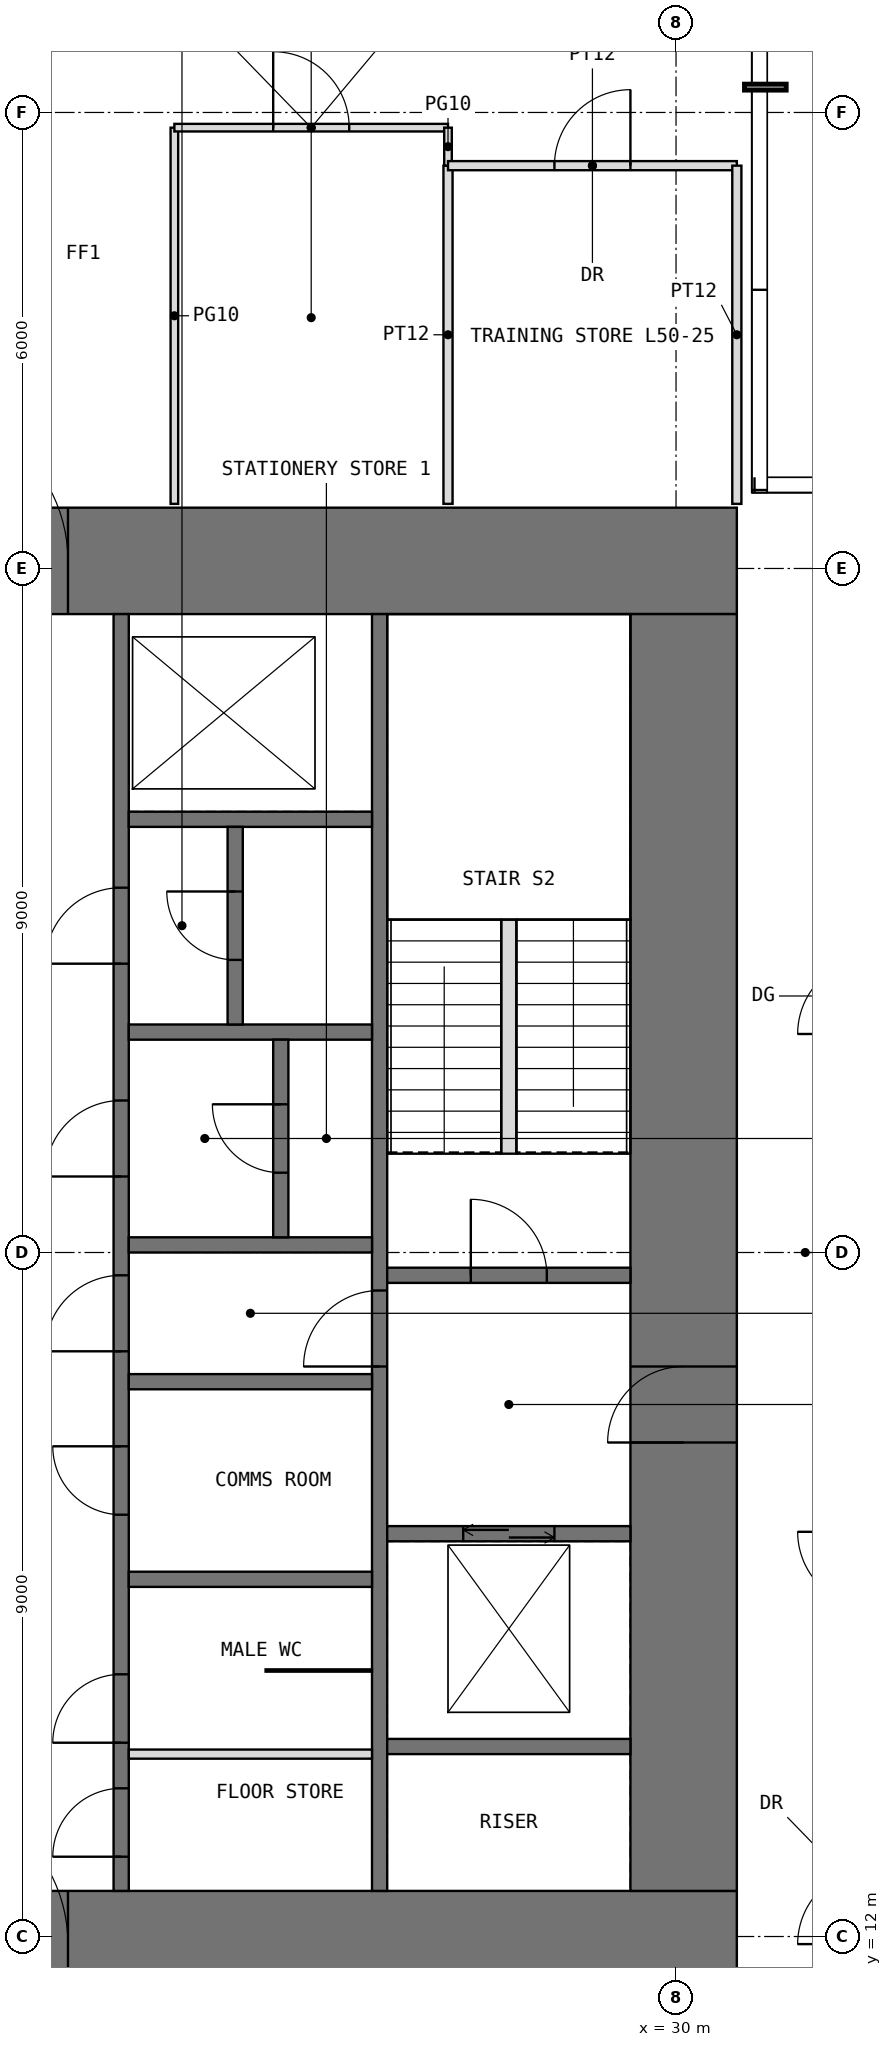
"""IFC4 building model, lengths in metres.
Left out: names, types, materials, properties, quantities, classifications, styles, units other than length and angle.
Written with IfcOpenShell. Run it as: python <this file> out.ifc"""

import sys

from ifc_helpers import new_model, si_unit, direction, frame, frame_2d, origin, place, context, subcontext, project, spatial, rectangle, extrude, element, fill, save


model = new_model("IFC4")
c1 = context("Model", 3, precision=1e-05, world=origin(), true_north=direction((0.0, 1.0)))
c2 = subcontext(c1, "Body", "Model", "MODEL_VIEW")
j1 = project(units=[si_unit("LENGTHUNIT", "METRE"), si_unit("PLANEANGLEUNIT", "RADIAN")], contexts=[c1])
p1 = place(None, origin())
s1 = spatial("IfcSite", under=j1, at=p1, CompositionType="ELEMENT")
p2 = place(p1, origin())
s2 = spatial("IfcBuilding", under=s1, at=p2, CompositionType="ELEMENT")
p3 = place(p2, frame((0.0, 0.0, 210.5)))
s3 = spatial("IfcBuildingStorey", under=s2, at=p3, CompositionType="ELEMENT", Elevation=210.5)
p4 = place(p3, frame((11.2, 11.9, -0.05), z_axis=(0.0, 0.0, 1.0), x_axis=(1.0, 0.0, 0.0)))
e1 = element("IfcWall", 1, at=p4, inside=s3, PredefinedType="SHEAR", context=c2, shape_type="SweptSolid", body=[
    extrude(rectangle(XDim=19.6, YDim=1.4, at=frame_2d((9.8, 0.0))), origin(), (0.0, 0.0, 1.0), 4.0),
])
p5 = place(p4, frame((8.8, 0.0, 0.05)))
e2 = element("IfcOpeningElement", 2, at=p5, cuts=e1, PredefinedType="OPENING", context=c2, shape_type="SweptSolid", body=[
    extrude(rectangle(XDim=2.0, YDim=2.2, at=frame_2d((1.0, 1.1))), frame((0.0, 0.71, 0.0), z_axis=(0.0, -1.0, 0.0), x_axis=(1.0, 0.0, 0.0)), (0.0, 0.0, 1.0), 1.42),
])
p6 = place(p3, frame((11.2, 30.1, -0.05), z_axis=(0.0, 0.0, 1.0), x_axis=(1.0, 0.0, 0.0)))
e3 = element("IfcWall", 3, at=p6, inside=s3, PredefinedType="SHEAR", context=c2, shape_type="SweptSolid", body=[
    extrude(rectangle(XDim=19.6, YDim=1.4, at=frame_2d((9.8, 0.0))), origin(), (0.0, 0.0, 1.0), 4.0),
])
p7 = place(p6, frame((8.8, 0.0, 0.05)))
e4 = element("IfcOpeningElement", 4, at=p7, cuts=e3, PredefinedType="OPENING", context=c2, shape_type="SweptSolid", body=[
    extrude(rectangle(XDim=2.0, YDim=2.2, at=frame_2d((1.0, 1.1))), frame((0.0, 0.71, 0.0), z_axis=(0.0, -1.0, 0.0), x_axis=(1.0, 0.0, 0.0)), (0.0, 0.0, 1.0), 1.42),
])
p8 = place(p3, frame((30.1, 12.6, -0.05), z_axis=(0.0, 0.0, 1.0), x_axis=(0.0, 1.0, 0.0)))
e5 = element("IfcWall", 5, at=p8, inside=s3, PredefinedType="SHEAR", context=c2, shape_type="SweptSolid", body=[
    extrude(rectangle(XDim=16.8, YDim=1.4, at=frame_2d((8.4, 0.0))), origin(), (0.0, 0.0, 1.0), 4.0),
])
p9 = place(p8, frame((5.9, 0.0, 0.05)))
e6 = element("IfcOpeningElement", 6, at=p9, cuts=e5, PredefinedType="OPENING", context=c2, shape_type="SweptSolid", body=[
    extrude(rectangle(XDim=1.0, YDim=2.2, at=frame_2d((0.5, 1.1))), frame((0.0, 0.71, 0.0), z_axis=(0.0, -1.0, 0.0), x_axis=(1.0, 0.0, 0.0)), (0.0, 0.0, 1.0), 1.42),
])
p10 = place(p3, frame((22.7, 12.6, -0.05), z_axis=(0.0, 0.0, 1.0), x_axis=(0.0, 1.0, 0.0)))
e7 = element("IfcWall", 7, at=p10, inside=s3, PredefinedType="SHEAR", context=c2, shape_type="SweptSolid", body=[
    extrude(rectangle(XDim=16.8, YDim=0.2, at=frame_2d((8.4, 0.0))), origin(), (0.0, 0.0, 1.0), 4.0),
])
p11 = place(p10, frame((0.45, 0.0, 0.05)))
e8 = element("IfcOpeningElement", 8, at=p11, cuts=e7, PredefinedType="OPENING", context=c2, shape_type="SweptSolid", body=[
    extrude(rectangle(XDim=0.9, YDim=2.2, at=frame_2d((0.45, 1.1))), frame((0.0, 0.11, 0.0), z_axis=(0.0, -1.0, 0.0), x_axis=(1.0, 0.0, 0.0)), (0.0, 0.0, 1.0), 0.22),
])
p12 = place(p10, frame((7.1, 0.0, 0.05)))
e9 = element("IfcOpeningElement", 9, at=p12, cuts=e7, PredefinedType="OPENING", context=c2, shape_type="SweptSolid", body=[
    extrude(rectangle(XDim=1.0, YDim=2.2, at=frame_2d((0.5, 1.1))), frame((0.0, 0.11, 0.0), z_axis=(0.0, -1.0, 0.0), x_axis=(1.0, 0.0, 0.0)), (0.0, 0.0, 1.0), 0.22),
])
p13 = place(p10, frame((1.95, 0.0, 0.05)))
e10 = element("IfcOpeningElement", 10, at=p13, cuts=e7, PredefinedType="OPENING", context=c2, shape_type="SweptSolid", body=[
    extrude(rectangle(XDim=0.9, YDim=2.2, at=frame_2d((0.45, 1.1))), frame((0.0, 0.11, 0.0), z_axis=(0.0, -1.0, 0.0), x_axis=(1.0, 0.0, 0.0)), (0.0, 0.0, 1.0), 0.22),
])
p14 = place(p10, frame((4.95, 0.0, 0.05)))
e11 = element("IfcOpeningElement", 11, at=p14, cuts=e7, PredefinedType="OPENING", context=c2, shape_type="SweptSolid", body=[
    extrude(rectangle(XDim=0.9, YDim=2.2, at=frame_2d((0.45, 1.1))), frame((0.0, 0.11, 0.0), z_axis=(0.0, -1.0, 0.0), x_axis=(1.0, 0.0, 0.0)), (0.0, 0.0, 1.0), 0.22),
])
p15 = place(p10, frame((9.4, 0.0, 0.05)))
e12 = element("IfcOpeningElement", 12, at=p15, cuts=e7, PredefinedType="OPENING", context=c2, shape_type="SweptSolid", body=[
    extrude(rectangle(XDim=1.0, YDim=2.2, at=frame_2d((0.5, 1.1))), frame((0.0, 0.11, 0.0), z_axis=(0.0, -1.0, 0.0), x_axis=(1.0, 0.0, 0.0)), (0.0, 0.0, 1.0), 0.22),
])
p16 = place(p10, frame((12.2, 0.0, 0.05)))
e13 = element("IfcOpeningElement", 13, at=p16, cuts=e7, PredefinedType="OPENING", context=c2, shape_type="SweptSolid", body=[
    extrude(rectangle(XDim=1.0, YDim=2.2, at=frame_2d((0.5, 1.1))), frame((0.0, 0.11, 0.0), z_axis=(0.0, -1.0, 0.0), x_axis=(1.0, 0.0, 0.0)), (0.0, 0.0, 1.0), 0.22),
])
p17 = place(p3, frame((26.1, 12.6, -0.05), z_axis=(0.0, 0.0, 1.0), x_axis=(0.0, 1.0, 0.0)))
e14 = element("IfcWall", 14, at=p17, inside=s3, PredefinedType="SHEAR", context=c2, shape_type="SweptSolid", body=[
    extrude(rectangle(XDim=16.8, YDim=0.2, at=frame_2d((8.4, 0.0))), origin(), (0.0, 0.0, 1.0), 4.0),
])
p18 = place(p17, frame((6.9, 0.0, 0.05)))
e15 = element("IfcOpeningElement", 15, at=p18, cuts=e14, PredefinedType="OPENING", context=c2, shape_type="SweptSolid", body=[
    extrude(rectangle(XDim=1.0, YDim=2.2, at=frame_2d((0.5, 1.1))), frame((0.0, 0.11, 0.0), z_axis=(0.0, -1.0, 0.0), x_axis=(1.0, 0.0, 0.0)), (0.0, 0.0, 1.0), 0.22),
])
for number, where, z_axis, x_axis in (
    (16, (22.8, 16.7, -0.05), (0.0, 0.0, 1.0), (1.0, 0.0, 0.0)),
    (17, (22.8, 19.3, -0.05), (0.0, 0.0, 1.0), (1.0, 0.0, 0.0)),
    (18, (22.8, 21.1, -0.05), (0.0, 0.0, 1.0), (1.0, 0.0, 0.0)),
    (19, (22.8, 23.9, -0.05), (0.0, 0.0, 1.0), (1.0, 0.0, 0.0)),
    (20, (22.8, 26.7, -0.05), (0.0, 0.0, 1.0), (1.0, 0.0, 0.0)),
    (21, (26.2, 14.5, -0.05), (0.0, 0.0, 1.0), (1.0, 0.0, 0.0)),
):
    element("IfcWall", number, at=place(p3, frame(where, z_axis=z_axis, x_axis=x_axis)), inside=s3, PredefinedType="SHEAR", context=c2, shape_type="SweptSolid", body=[
        extrude(rectangle(XDim=3.2, YDim=0.2, at=frame_2d((1.6, 0.0))), origin(), (0.0, 0.0, 1.0), 4.0),
    ])
p19 = place(p3, frame((26.2, 17.3, -0.05), z_axis=(0.0, 0.0, 1.0), x_axis=(1.0, 0.0, 0.0)))
e22 = element("IfcWall", 22, at=p19, inside=s3, PredefinedType="SHEAR", context=c2, shape_type="SweptSolid", body=[
    extrude(rectangle(XDim=3.2, YDim=0.2, at=frame_2d((1.6, 0.0))), origin(), (0.0, 0.0, 1.0), 4.0),
])
p20 = place(p19, frame((1.0, 0.0, 0.05)))
e23 = element("IfcOpeningElement", 23, at=p20, cuts=e22, PredefinedType="OPENING", context=c2, shape_type="SweptSolid", body=[
    extrude(rectangle(XDim=1.2, YDim=2.2, at=frame_2d((0.6, 1.1))), frame((0.0, 0.11, 0.0), z_axis=(0.0, -1.0, 0.0), x_axis=(1.0, 0.0, 0.0)), (0.0, 0.0, 1.0), 0.22),
])
p21 = place(p3, frame((26.2, 20.7, -0.05), z_axis=(0.0, 0.0, 1.0), x_axis=(1.0, 0.0, 0.0)))
e24 = element("IfcWall", 24, at=p21, inside=s3, PredefinedType="SHEAR", context=c2, shape_type="SweptSolid", body=[
    extrude(rectangle(XDim=3.2, YDim=0.2, at=frame_2d((1.6, 0.0))), origin(), (0.0, 0.0, 1.0), 4.0),
])
p22 = place(p21, frame((1.1, 0.0, 0.05)))
e25 = element("IfcOpeningElement", 25, at=p22, cuts=e24, PredefinedType="OPENING", context=c2, shape_type="SweptSolid", body=[
    extrude(rectangle(XDim=1.0, YDim=2.2, at=frame_2d((0.5, 1.1))), frame((0.0, 0.11, 0.0), z_axis=(0.0, -1.0, 0.0), x_axis=(1.0, 0.0, 0.0)), (0.0, 0.0, 1.0), 0.22),
])
p23 = place(p3, frame((22.8, 14.4, 0.0), z_axis=(0.0, 0.0, 1.0), x_axis=(1.0, 0.0, 0.0)))
e26 = element("IfcWall", 26, at=p23, inside=s3, PredefinedType="PARTITIONING", context=c2, shape_type="SweptSolid", body=[
    extrude(rectangle(XDim=3.2, YDim=0.12, at=frame_2d((1.6, 0.0))), origin(), (0.0, 0.0, 1.0), 3.75),
])
p24 = place(p3, frame((24.6, 15.5, 0.0), z_axis=(0.0, 0.0, 1.0), x_axis=(1.0, 0.0, 0.0)))
e27 = element("IfcWall", 27, at=p24, inside=s3, PredefinedType="PARTITIONING", context=c2, shape_type="SweptSolid", body=[
    extrude(rectangle(XDim=1.4, YDim=0.03, at=frame_2d((0.7, 0.0))), origin(), (0.0, 0.0, 1.0), 3.75),
])
p25 = place(p3, frame((24.8, 21.2, -0.05), z_axis=(0.0, 0.0, 1.0), x_axis=(0.0, 1.0, 0.0)))
e28 = element("IfcWall", 28, at=p25, inside=s3, PredefinedType="SHEAR", context=c2, shape_type="SweptSolid", body=[
    extrude(rectangle(XDim=2.6, YDim=0.2, at=frame_2d((1.3, 0.0))), origin(), (0.0, 0.0, 1.0), 4.0),
])
p26 = place(p25, frame((0.85, 0.0, 0.05)))
e29 = element("IfcOpeningElement", 29, at=p26, cuts=e28, PredefinedType="OPENING", context=c2, shape_type="SweptSolid", body=[
    extrude(rectangle(XDim=0.9, YDim=2.2, at=frame_2d((0.45, 1.1))), frame((0.0, 0.11, 0.0), z_axis=(0.0, -1.0, 0.0), x_axis=(1.0, 0.0, 0.0)), (0.0, 0.0, 1.0), 0.22),
])
p27 = place(p3, frame((24.2, 24.0, -0.05), z_axis=(0.0, 0.0, 1.0), x_axis=(0.0, 1.0, 0.0)))
e30 = element("IfcWall", 30, at=p27, inside=s3, PredefinedType="SHEAR", context=c2, shape_type="SweptSolid", body=[
    extrude(rectangle(XDim=2.6, YDim=0.2, at=frame_2d((1.3, 0.0))), origin(), (0.0, 0.0, 1.0), 4.0),
])
p28 = place(p27, frame((0.85, 0.0, 0.05)))
e31 = element("IfcOpeningElement", 31, at=p28, cuts=e30, PredefinedType="OPENING", context=c2, shape_type="SweptSolid", body=[
    extrude(rectangle(XDim=0.9, YDim=2.2, at=frame_2d((0.45, 1.1))), frame((0.0, 0.11, 0.0), z_axis=(0.0, -1.0, 0.0), x_axis=(1.0, 0.0, 0.0)), (0.0, 0.0, 1.0), 0.22),
])
p29 = place(p3, frame((23.4, 30.85, 0.0), z_axis=(0.0, 0.0, 1.0), x_axis=(0.0, 1.0, 0.0)))
e32 = element("IfcWall", 32, at=p29, inside=s3, PredefinedType="PARTITIONING", context=c2, shape_type="SweptSolid", body=[
    extrude(rectangle(XDim=4.95, YDim=0.1, at=frame_2d((2.475, 0.0))), origin(), (0.0, 0.0, 1.0), 3.75),
])
p30 = place(p3, frame((23.4, 35.8, 0.0), z_axis=(0.0, 0.0, 1.0), x_axis=(1.0, 0.0, 0.0)))
e33 = element("IfcWall", 33, at=p30, inside=s3, PredefinedType="PARTITIONING", context=c2, shape_type="SweptSolid", body=[
    extrude(rectangle(XDim=3.6, YDim=0.1, at=frame_2d((1.8, 0.0))), origin(), (0.0, 0.0, 1.0), 3.75),
])
p31 = place(p30, frame((1.3, 0.0, 0.0)))
e34 = element("IfcOpeningElement", 34, at=p31, cuts=e33, PredefinedType="OPENING", context=c2, shape_type="SweptSolid", body=[
    extrude(rectangle(XDim=1.0, YDim=2.4, at=frame_2d((0.5, 1.2))), frame((0.0, 0.06, 0.0), z_axis=(0.0, -1.0, 0.0), x_axis=(1.0, 0.0, 0.0)), (0.0, 0.0, 1.0), 0.12),
])
p32 = place(p3, frame((27.0, 30.85, 0.0), z_axis=(0.0, 0.0, 1.0), x_axis=(0.0, 1.0, 0.0)))
e35 = element("IfcWall", 35, at=p32, inside=s3, PredefinedType="PARTITIONING", context=c2, shape_type="SweptSolid", body=[
    extrude(rectangle(XDim=4.45, YDim=0.12, at=frame_2d((2.225, 0.0))), origin(), (0.0, 0.0, 1.0), 3.75),
])
p33 = place(p3, frame((27.0, 35.3, 0.0), z_axis=(0.0, 0.0, 1.0), x_axis=(0.0, 1.0, 0.0)))
e36 = element("IfcWall", 36, at=p33, inside=s3, PredefinedType="PARTITIONING", context=c2, shape_type="SweptSolid", body=[
    extrude(rectangle(XDim=0.5, YDim=0.1, at=frame_2d((0.25, 0.0))), origin(), (0.0, 0.0, 1.0), 3.75),
])
p34 = place(p3, frame((27.0, 35.3, 0.0), z_axis=(0.0, 0.0, 1.0), x_axis=(1.0, 0.0, 0.0)))
e37 = element("IfcWall", 37, at=p34, inside=s3, PredefinedType="PARTITIONING", context=c2, shape_type="SweptSolid", body=[
    extrude(rectangle(XDim=3.8, YDim=0.12, at=frame_2d((1.9, 0.0))), origin(), (0.0, 0.0, 1.0), 3.75),
])
p35 = place(p34, frame((1.4, 0.0, 0.0)))
e38 = element("IfcOpeningElement", 38, at=p35, cuts=e37, PredefinedType="OPENING", context=c2, shape_type="SweptSolid", body=[
    extrude(rectangle(XDim=1.0, YDim=2.2, at=frame_2d((0.5, 1.1))), frame((0.0, 0.07, 0.0), z_axis=(0.0, -1.0, 0.0), x_axis=(1.0, 0.0, 0.0)), (0.0, 0.0, 1.0), 0.14),
])
p36 = place(p3, frame((30.8, 30.85, 0.0), z_axis=(0.0, 0.0, 1.0), x_axis=(0.0, 1.0, 0.0)))
e39 = element("IfcWall", 39, at=p36, inside=s3, PredefinedType="PARTITIONING", context=c2, shape_type="SweptSolid", body=[
    extrude(rectangle(XDim=4.45, YDim=0.12, at=frame_2d((2.225, 0.0))), origin(), (0.0, 0.0, 1.0), 3.75),
])
p37 = place(p3, frame((27.8, 22.3, 0.0), z_axis=(0.0, 0.0, 1.0), x_axis=(0.0, 1.0, 0.0)))
e40 = element("IfcWall", 40, at=p37, inside=s3, PredefinedType="PARTITIONING", context=c2, shape_type="SweptSolid", body=[
    extrude(rectangle(XDim=3.08, YDim=0.2, at=frame_2d((1.54, 0.0))), origin(), (0.0, 0.0, 1.0), 4.0),
])
p38 = place(p5, origin())
e41 = element("IfcDoor", 41, at=p38, inside=s3, OperationType="DOUBLE_DOOR_SINGLE_SWING", PredefinedType="DOOR", context=c2, shape_type="SweptSolid", body=[
    extrude(rectangle(XDim=2.0, YDim=2.2, at=frame_2d((1.0, 1.1))), frame((0.0, 0.025, 0.0), z_axis=(0.0, -1.0, 0.0), x_axis=(1.0, 0.0, 0.0)), (0.0, 0.0, 1.0), 0.05),
])
fill(e2, e41)
p39 = place(p7, origin())
e42 = element("IfcDoor", 42, at=p39, inside=s3, OperationType="DOUBLE_DOOR_SINGLE_SWING", PredefinedType="DOOR", context=c2, shape_type="SweptSolid", body=[
    extrude(rectangle(XDim=2.0, YDim=2.2, at=frame_2d((1.0, 1.1))), frame((0.0, 0.025, 0.0), z_axis=(0.0, -1.0, 0.0), x_axis=(1.0, 0.0, 0.0)), (0.0, 0.0, 1.0), 0.05),
])
fill(e4, e42)
p40 = place(p11, origin())
e43 = element("IfcDoor", 43, at=p40, inside=s3, OperationType="SINGLE_SWING_LEFT", PredefinedType="DOOR", context=c2, shape_type="SweptSolid", body=[
    extrude(rectangle(XDim=0.9, YDim=2.2, at=frame_2d((0.45, 1.1))), frame((0.0, 0.025, 0.0), z_axis=(0.0, -1.0, 0.0), x_axis=(1.0, 0.0, 0.0)), (0.0, 0.0, 1.0), 0.05),
])
fill(e8, e43)
p41 = place(p9, origin())
e44 = element("IfcDoor", 44, at=p41, inside=s3, OperationType="SINGLE_SWING_LEFT", PredefinedType="DOOR", context=c2, shape_type="SweptSolid", body=[
    extrude(rectangle(XDim=1.0, YDim=2.2, at=frame_2d((0.5, 1.1))), frame((0.0, 0.025, 0.0), z_axis=(0.0, -1.0, 0.0), x_axis=(1.0, 0.0, 0.0)), (0.0, 0.0, 1.0), 0.05),
])
fill(e6, e44)
p42 = place(p22, origin())
e45 = element("IfcDoor", 45, at=p42, inside=s3, OperationType="SINGLE_SWING_LEFT", PredefinedType="DOOR", context=c2, shape_type="SweptSolid", body=[
    extrude(rectangle(XDim=1.0, YDim=2.2, at=frame_2d((0.5, 1.1))), frame((0.0, 0.025, 0.0), z_axis=(0.0, -1.0, 0.0), x_axis=(1.0, 0.0, 0.0)), (0.0, 0.0, 1.0), 0.05),
])
fill(e25, e45)
p43 = place(p18, origin())
e46 = element("IfcDoor", 46, at=p43, inside=s3, OperationType="SINGLE_SWING_LEFT", PredefinedType="DOOR", context=c2, shape_type="SweptSolid", body=[
    extrude(rectangle(XDim=1.0, YDim=2.2, at=frame_2d((0.5, 1.1))), frame((0.0, 0.025, 0.0), z_axis=(0.0, -1.0, 0.0), x_axis=(1.0, 0.0, 0.0)), (0.0, 0.0, 1.0), 0.05),
])
fill(e15, e46)
p44 = place(p12, origin())
e47 = element("IfcDoor", 47, at=p44, inside=s3, OperationType="SINGLE_SWING_LEFT", PredefinedType="DOOR", context=c2, shape_type="SweptSolid", body=[
    extrude(rectangle(XDim=1.0, YDim=2.2, at=frame_2d((0.5, 1.1))), frame((0.0, 0.025, 0.0), z_axis=(0.0, -1.0, 0.0), x_axis=(1.0, 0.0, 0.0)), (0.0, 0.0, 1.0), 0.05),
])
fill(e9, e47)
p45 = place(p13, origin())
e48 = element("IfcDoor", 48, at=p45, inside=s3, OperationType="SINGLE_SWING_LEFT", PredefinedType="DOOR", context=c2, shape_type="SweptSolid", body=[
    extrude(rectangle(XDim=0.9, YDim=2.2, at=frame_2d((0.45, 1.1))), frame((0.0, 0.025, 0.0), z_axis=(0.0, -1.0, 0.0), x_axis=(1.0, 0.0, 0.0)), (0.0, 0.0, 1.0), 0.05),
])
fill(e10, e48)
p46 = place(p14, origin())
e49 = element("IfcDoor", 49, at=p46, inside=s3, OperationType="SINGLE_SWING_RIGHT", PredefinedType="DOOR", context=c2, shape_type="SweptSolid", body=[
    extrude(rectangle(XDim=0.9, YDim=2.2, at=frame_2d((0.45, 1.1))), frame((0.0, 0.025, 0.0), z_axis=(0.0, -1.0, 0.0), x_axis=(1.0, 0.0, 0.0)), (0.0, 0.0, 1.0), 0.05),
])
fill(e11, e49)
p47 = place(p15, origin())
e50 = element("IfcDoor", 50, at=p47, inside=s3, OperationType="SINGLE_SWING_LEFT", PredefinedType="DOOR", context=c2, shape_type="SweptSolid", body=[
    extrude(rectangle(XDim=1.0, YDim=2.2, at=frame_2d((0.5, 1.1))), frame((0.0, 0.025, 0.0), z_axis=(0.0, -1.0, 0.0), x_axis=(1.0, 0.0, 0.0)), (0.0, 0.0, 1.0), 0.05),
])
fill(e12, e50)
p48 = place(p26, origin())
e51 = element("IfcDoor", 51, at=p48, inside=s3, OperationType="SINGLE_SWING_RIGHT", PredefinedType="DOOR", context=c2, shape_type="SweptSolid", body=[
    extrude(rectangle(XDim=0.9, YDim=2.2, at=frame_2d((0.45, 1.1))), frame((0.0, 0.025, 0.0), z_axis=(0.0, -1.0, 0.0), x_axis=(1.0, 0.0, 0.0)), (0.0, 0.0, 1.0), 0.05),
])
fill(e29, e51)
p49 = place(p16, origin())
e52 = element("IfcDoor", 52, at=p49, inside=s3, OperationType="SINGLE_SWING_LEFT", PredefinedType="DOOR", context=c2, shape_type="SweptSolid", body=[
    extrude(rectangle(XDim=1.0, YDim=2.2, at=frame_2d((0.5, 1.1))), frame((0.0, 0.025, 0.0), z_axis=(0.0, -1.0, 0.0), x_axis=(1.0, 0.0, 0.0)), (0.0, 0.0, 1.0), 0.05),
])
fill(e13, e52)
p50 = place(p28, origin())
e53 = element("IfcDoor", 53, at=p50, inside=s3, OperationType="SINGLE_SWING_RIGHT", PredefinedType="DOOR", context=c2, shape_type="SweptSolid", body=[
    extrude(rectangle(XDim=0.9, YDim=2.2, at=frame_2d((0.45, 1.1))), frame((0.0, 0.025, 0.0), z_axis=(0.0, -1.0, 0.0), x_axis=(1.0, 0.0, 0.0)), (0.0, 0.0, 1.0), 0.05),
])
fill(e31, e53)
p51 = place(p31, origin())
e54 = element("IfcDoor", 54, at=p51, inside=s3, OperationType="SINGLE_SWING_LEFT", PredefinedType="DOOR", context=c2, shape_type="SweptSolid", body=[
    extrude(rectangle(XDim=1.0, YDim=2.4, at=frame_2d((0.5, 1.2))), frame((0.0, 0.025, 0.0), z_axis=(0.0, -1.0, 0.0), x_axis=(1.0, 0.0, 0.0)), (0.0, 0.0, 1.0), 0.05),
])
fill(e34, e54)
p52 = place(p35, origin())
e55 = element("IfcDoor", 55, at=p52, inside=s3, OperationType="SINGLE_SWING_RIGHT", PredefinedType="DOOR", context=c2, shape_type="SweptSolid", body=[
    extrude(rectangle(XDim=1.0, YDim=2.2, at=frame_2d((0.5, 1.1))), frame((0.0, 0.025, 0.0), z_axis=(0.0, -1.0, 0.0), x_axis=(1.0, 0.0, 0.0)), (0.0, 0.0, 1.0), 0.05),
])
fill(e38, e55)
p53 = place(p20, origin())
e56 = element("IfcDoor", 56, at=p53, inside=s3, OperationType="DOUBLE_DOOR_SLIDING", PredefinedType="DOOR", context=c2, shape_type="SweptSolid", body=[
    extrude(rectangle(XDim=1.2, YDim=2.2, at=frame_2d((0.6, 1.1))), frame((0.0, 0.025, 0.0), z_axis=(0.0, -1.0, 0.0), x_axis=(1.0, 0.0, 0.0)), (0.0, 0.0, 1.0), 0.05),
])
fill(e23, e56)
save(model, sys.argv[1])
